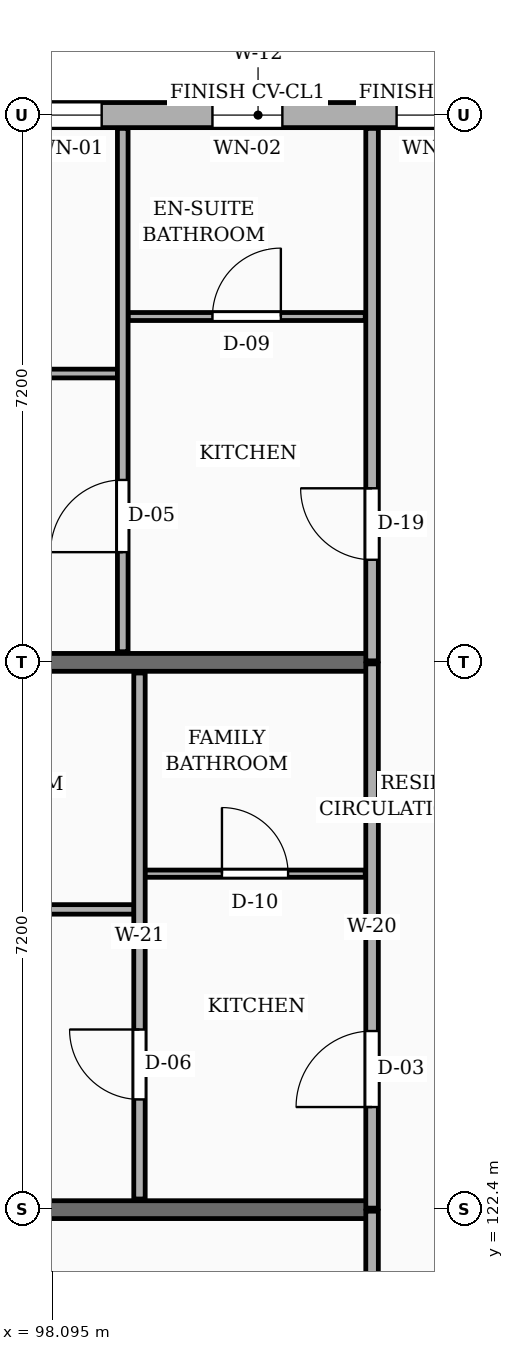
"""IFC4 building model, lengths in metres.
Left out: names, types, materials, properties, quantities, classifications, styles, units other than length and angle.
Written with IfcOpenShell. Run it as: python <this file> out.ifc"""

import sys

from ifc_helpers import new_model, si_unit, direction, frame, frame_2d, origin, place, context, subcontext, project, spatial, rectangle, extrude, element, fill, save


model = new_model("IFC4")
c1 = context("Model", 3, precision=1e-05, world=origin(), true_north=direction((0.0, 1.0)))
c2 = subcontext(c1, "Body", "Model", "MODEL_VIEW")
j1 = project(units=[si_unit("LENGTHUNIT", "METRE"), si_unit("PLANEANGLEUNIT", "RADIAN")], contexts=[c1])
p1 = place(None, origin())
s1 = spatial("IfcSite", under=j1, at=p1, CompositionType="ELEMENT")
p2 = place(p1, origin())
s2 = spatial("IfcBuilding", under=s1, at=p2, CompositionType="ELEMENT")
p3 = place(p2, frame((0.0, 0.0, 20.25)))
s3 = spatial("IfcBuildingStorey", under=s2, at=p3, CompositionType="ELEMENT", Elevation=20.25)
for number, where, z_axis, x_axis in (
    (1, (90.275, 122.4, 0.0), (0.0, 0.0, 1.0), (1.0, 0.0, 0.0)),
    (2, (90.275, 129.6, 0.0), (0.0, 0.0, 1.0), (1.0, 0.0, 0.0)),
):
    element("IfcWall", number, at=place(p3, frame(where, z_axis=z_axis, x_axis=x_axis)), inside=s3, PredefinedType="SOLIDWALL", context=c2, shape_type="SweptSolid", body=[
        extrude(rectangle(XDim=12.025, YDim=0.235, at=frame_2d((6.013, 0.0))), origin(), (0.0, 0.0, 1.0), 2.19),
    ])
p4 = place(p3, frame((104.125, 136.8, 0.0), z_axis=(0.0, 0.0, 1.0), x_axis=(-1.0, 0.0, 0.0)))
e3 = element("IfcWall", 3, at=p4, inside=s3, PredefinedType="SOLIDWALL", context=c2, shape_type="SweptSolid", body=[
    extrude(rectangle(XDim=6.65, YDim=0.33, at=frame_2d((3.325, 0.0))), origin(), (0.0, 0.0, 1.0), 2.46),
])
p5 = place(p4, frame((0.462, 0.0, 0.78)))
e4 = element("IfcOpeningElement", 4, at=p5, cuts=e3, PredefinedType="OPENING", context=c2, shape_type="SweptSolid", body=[
    extrude(rectangle(XDim=1.04, YDim=1.26, at=frame_2d((0.52, 0.63))), frame((0.0, 0.175, 0.0), z_axis=(0.0, -1.0, 0.0), x_axis=(1.0, 0.0, 0.0)), (0.0, 0.0, 1.0), 0.35),
])
p6 = place(p4, frame((3.005, 0.0, 0.78)))
e5 = element("IfcOpeningElement", 5, at=p6, cuts=e3, PredefinedType="OPENING", context=c2, shape_type="SweptSolid", body=[
    extrude(rectangle(XDim=0.92, YDim=1.15, at=frame_2d((0.46, 0.575))), frame((0.0, 0.175, 0.0), z_axis=(0.0, -1.0, 0.0), x_axis=(1.0, 0.0, 0.0)), (0.0, 0.0, 1.0), 0.35),
])
p7 = place(p4, frame((5.383, 0.0, 0.78)))
e6 = element("IfcOpeningElement", 6, at=p7, cuts=e3, PredefinedType="OPENING", context=c2, shape_type="SweptSolid", body=[
    extrude(rectangle(XDim=0.85, YDim=1.15, at=frame_2d((0.425, 0.575))), frame((0.0, 0.175, 0.0), z_axis=(0.0, -1.0, 0.0), x_axis=(1.0, 0.0, 0.0)), (0.0, 0.0, 1.0), 0.35),
])
p8 = place(p3, frame((102.3, 115.22, 0.0), z_axis=(0.0, 0.0, 1.0), x_axis=(0.0, 1.0, 0.0)))
e7 = element("IfcWall", 7, at=p8, inside=s3, PredefinedType="PARTITIONING", context=c2, shape_type="SweptSolid", body=[
    extrude(rectangle(XDim=7.16, YDim=0.165, at=frame_2d((3.58, 0.0))), origin(), (0.0, 0.0, 1.0), 2.325),
])
p9 = place(p8, frame((4.78, 0.0, 0.0)))
e8 = element("IfcOpeningElement", 8, at=p9, cuts=e7, PredefinedType="OPENING", context=c2, shape_type="SweptSolid", body=[
    extrude(rectangle(XDim=1.14, YDim=2.18, at=frame_2d((0.57, 1.09))), frame((0.0, 0.093, 0.0), z_axis=(0.0, -1.0, 0.0), x_axis=(1.0, 0.0, 0.0)), (0.0, 0.0, 1.0), 0.185),
])
p10 = place(p3, frame((102.3, 122.42, 0.0), z_axis=(0.0, 0.0, 1.0), x_axis=(0.0, 1.0, 0.0)))
e9 = element("IfcWall", 9, at=p10, inside=s3, PredefinedType="PARTITIONING", context=c2, shape_type="SweptSolid", body=[
    extrude(rectangle(XDim=7.16, YDim=0.165, at=frame_2d((3.58, 0.0))), origin(), (0.0, 0.0, 1.0), 2.325),
])
p11 = place(p10, frame((1.33, 0.0, 0.0)))
e10 = element("IfcOpeningElement", 10, at=p11, cuts=e9, PredefinedType="OPENING", context=c2, shape_type="SweptSolid", body=[
    extrude(rectangle(XDim=1.0, YDim=2.15, at=frame_2d((0.5, 1.075))), frame((0.0, 0.093, 0.0), z_axis=(0.0, -1.0, 0.0), x_axis=(1.0, 0.0, 0.0)), (0.0, 0.0, 1.0), 0.185),
])
p12 = place(p3, frame((102.3, 129.62, 0.0), z_axis=(0.0, 0.0, 1.0), x_axis=(0.0, 1.0, 0.0)))
e11 = element("IfcWall", 11, at=p12, inside=s3, PredefinedType="PARTITIONING", context=c2, shape_type="SweptSolid", body=[
    extrude(rectangle(XDim=7.005, YDim=0.165, at=frame_2d((3.502, 0.0))), origin(), (0.0, 0.0, 1.0), 2.325),
])
p13 = place(p12, frame((1.33, 0.0, 0.0)))
e12 = element("IfcOpeningElement", 12, at=p13, cuts=e11, PredefinedType="OPENING", context=c2, shape_type="SweptSolid", body=[
    extrude(rectangle(XDim=0.94, YDim=2.12, at=frame_2d((0.47, 1.06))), frame((0.0, 0.093, 0.0), z_axis=(0.0, -1.0, 0.0), x_axis=(1.0, 0.0, 0.0)), (0.0, 0.0, 1.0), 0.185),
])
p14 = place(p3, frame((90.175, 126.35, 0.0), z_axis=(0.0, 0.0, 1.0), x_axis=(1.0, 0.0, 0.0)))
e13 = element("IfcWall", 13, at=p14, inside=s3, PredefinedType="PARTITIONING", context=c2, shape_type="SweptSolid", body=[
    extrude(rectangle(XDim=8.995, YDim=0.125, at=frame_2d((4.498, 0.0))), origin(), (0.0, 0.0, 1.0), 2.325),
])
p15 = place(p14, frame((4.058, 0.0, 0.0)))
e14 = element("IfcOpeningElement", 14, at=p15, cuts=e13, PredefinedType="OPENING", context=c2, shape_type="SweptSolid", body=[
    extrude(rectangle(XDim=0.88, YDim=2.08, at=frame_2d((0.44, 1.04))), frame((0.0, 0.073, 0.0), z_axis=(0.0, -1.0, 0.0), x_axis=(1.0, 0.0, 0.0)), (0.0, 0.0, 1.0), 0.145),
])
p16 = place(p3, frame((99.31, 126.82, 0.0), z_axis=(0.0, 0.0, 1.0), x_axis=(1.0, 0.0, 0.0)))
e15 = element("IfcWall", 15, at=p16, inside=s3, PredefinedType="PARTITIONING", context=c2, shape_type="SweptSolid", body=[
    extrude(rectangle(XDim=2.9, YDim=0.095, at=frame_2d((1.45, 0.0))), origin(), (0.0, 0.0, 1.0), 2.325),
])
p17 = place(p16, frame((1.015, 0.0, 0.0)))
e16 = element("IfcOpeningElement", 16, at=p17, cuts=e15, PredefinedType="OPENING", context=c2, shape_type="SweptSolid", body=[
    extrude(rectangle(XDim=0.87, YDim=2.05, at=frame_2d((0.435, 1.025))), frame((0.0, 0.058, 0.0), z_axis=(0.0, -1.0, 0.0), x_axis=(1.0, 0.0, 0.0)), (0.0, 0.0, 1.0), 0.115),
])
p18 = place(p3, frame((99.24, 122.54, 0.0), z_axis=(0.0, 0.0, 1.0), x_axis=(0.0, 1.0, 0.0)))
e17 = element("IfcWall", 17, at=p18, inside=s3, PredefinedType="PARTITIONING", context=c2, shape_type="SweptSolid", body=[
    extrude(rectangle(XDim=6.92, YDim=0.15, at=frame_2d((3.46, 0.0))), origin(), (0.0, 0.0, 1.0), 2.325),
])
p19 = place(p18, frame((1.31, 0.0, 0.0)))
e18 = element("IfcOpeningElement", 18, at=p19, cuts=e17, PredefinedType="OPENING", context=c2, shape_type="SweptSolid", body=[
    extrude(rectangle(XDim=0.92, YDim=2.1, at=frame_2d((0.46, 1.05))), frame((0.0, 0.085, 0.0), z_axis=(0.0, -1.0, 0.0), x_axis=(1.0, 0.0, 0.0)), (0.0, 0.0, 1.0), 0.17),
])
p20 = place(p3, frame((90.175, 133.4, 0.0), z_axis=(0.0, 0.0, 1.0), x_axis=(1.0, 0.0, 0.0)))
e19 = element("IfcWall", 19, at=p20, inside=s3, PredefinedType="PARTITIONING", context=c2, shape_type="SweptSolid", body=[
    extrude(rectangle(XDim=8.775, YDim=0.115, at=frame_2d((4.387, 0.0))), origin(), (0.0, 0.0, 1.0), 2.325),
])
p21 = place(p20, frame((3.938, 0.0, 0.0)))
e20 = element("IfcOpeningElement", 20, at=p21, cuts=e19, PredefinedType="OPENING", context=c2, shape_type="SweptSolid", body=[
    extrude(rectangle(XDim=0.9, YDim=2.1, at=frame_2d((0.45, 1.05))), frame((0.0, 0.067, 0.0), z_axis=(0.0, -1.0, 0.0), x_axis=(1.0, 0.0, 0.0)), (0.0, 0.0, 1.0), 0.135),
])
p22 = place(p3, frame((99.09, 134.15, 0.0), z_axis=(0.0, 0.0, 1.0), x_axis=(1.0, 0.0, 0.0)))
e21 = element("IfcWall", 21, at=p22, inside=s3, PredefinedType="PARTITIONING", context=c2, shape_type="SweptSolid", body=[
    extrude(rectangle(XDim=3.12, YDim=0.105, at=frame_2d((1.56, 0.0))), origin(), (0.0, 0.0, 1.0), 2.325),
])
p23 = place(p22, frame((1.11, 0.0, 0.0)))
e22 = element("IfcOpeningElement", 22, at=p23, cuts=e21, PredefinedType="OPENING", context=c2, shape_type="SweptSolid", body=[
    extrude(rectangle(XDim=0.9, YDim=2.05, at=frame_2d((0.45, 1.025))), frame((0.0, 0.062, 0.0), z_axis=(0.0, -1.0, 0.0), x_axis=(1.0, 0.0, 0.0)), (0.0, 0.0, 1.0), 0.125),
])
p24 = place(p3, frame((99.02, 129.74, 0.0), z_axis=(0.0, 0.0, 1.0), x_axis=(0.0, 1.0, 0.0)))
e23 = element("IfcWall", 23, at=p24, inside=s3, PredefinedType="PARTITIONING", context=c2, shape_type="SweptSolid", body=[
    extrude(rectangle(XDim=6.885, YDim=0.14, at=frame_2d((3.442, 0.0))), origin(), (0.0, 0.0, 1.0), 2.325),
])
p25 = place(p24, frame((1.31, 0.0, 0.0)))
e24 = element("IfcOpeningElement", 24, at=p25, cuts=e23, PredefinedType="OPENING", context=c2, shape_type="SweptSolid", body=[
    extrude(rectangle(XDim=0.95, YDim=2.1, at=frame_2d((0.475, 1.05))), frame((0.0, 0.08, 0.0), z_axis=(0.0, -1.0, 0.0), x_axis=(1.0, 0.0, 0.0)), (0.0, 0.0, 1.0), 0.16),
])
p26 = place(p5, origin())
e25 = element("IfcWindow", 25, at=p26, inside=s3, PartitioningType="SINGLE_PANEL", PredefinedType="WINDOW", context=c2, shape_type="SweptSolid", body=[
    extrude(rectangle(XDim=1.04, YDim=1.26, at=frame_2d((0.52, 0.63))), frame((0.0, 0.03, 0.0), z_axis=(0.0, -1.0, 0.0), x_axis=(1.0, 0.0, 0.0)), (0.0, 0.0, 1.0), 0.06),
])
fill(e4, e25)
p27 = place(p6, origin())
e26 = element("IfcWindow", 26, at=p27, inside=s3, PartitioningType="SINGLE_PANEL", PredefinedType="WINDOW", context=c2, shape_type="SweptSolid", body=[
    extrude(rectangle(XDim=0.92, YDim=1.15, at=frame_2d((0.46, 0.575))), frame((0.0, 0.03, 0.0), z_axis=(0.0, -1.0, 0.0), x_axis=(1.0, 0.0, 0.0)), (0.0, 0.0, 1.0), 0.06),
])
fill(e5, e26)
p28 = place(p7, origin())
e27 = element("IfcWindow", 27, at=p28, inside=s3, PartitioningType="SINGLE_PANEL", PredefinedType="WINDOW", context=c2, shape_type="SweptSolid", body=[
    extrude(rectangle(XDim=0.85, YDim=1.15, at=frame_2d((0.425, 0.575))), frame((0.0, 0.03, 0.0), z_axis=(0.0, -1.0, 0.0), x_axis=(1.0, 0.0, 0.0)), (0.0, 0.0, 1.0), 0.06),
])
fill(e6, e27)
p29 = place(p11, origin())
e28 = element("IfcDoor", 28, at=p29, inside=s3, OperationType="SINGLE_SWING_LEFT", PredefinedType="DOOR", context=c2, shape_type="SweptSolid", body=[
    extrude(rectangle(XDim=1.0, YDim=2.15, at=frame_2d((0.5, 1.075))), frame((0.0, 0.025, 0.0), z_axis=(0.0, -1.0, 0.0), x_axis=(1.0, 0.0, 0.0)), (0.0, 0.0, 1.0), 0.05),
])
fill(e10, e28)
p30 = place(p13, origin())
e29 = element("IfcDoor", 29, at=p30, inside=s3, OperationType="SINGLE_SWING_RIGHT", PredefinedType="DOOR", context=c2, shape_type="SweptSolid", body=[
    extrude(rectangle(XDim=0.94, YDim=2.12, at=frame_2d((0.47, 1.06))), frame((0.0, 0.025, 0.0), z_axis=(0.0, -1.0, 0.0), x_axis=(1.0, 0.0, 0.0)), (0.0, 0.0, 1.0), 0.05),
])
fill(e12, e29)
p31 = place(p17, origin())
e30 = element("IfcDoor", 30, at=p31, inside=s3, OperationType="SINGLE_SWING_LEFT", PredefinedType="DOOR", context=c2, shape_type="SweptSolid", body=[
    extrude(rectangle(XDim=0.87, YDim=2.05, at=frame_2d((0.435, 1.025))), frame((0.0, 0.025, 0.0), z_axis=(0.0, -1.0, 0.0), x_axis=(1.0, 0.0, 0.0)), (0.0, 0.0, 1.0), 0.05),
])
fill(e16, e30)
p32 = place(p19, origin())
e31 = element("IfcDoor", 31, at=p32, inside=s3, OperationType="SINGLE_SWING_RIGHT", PredefinedType="DOOR", context=c2, shape_type="SweptSolid", body=[
    extrude(rectangle(XDim=0.92, YDim=2.1, at=frame_2d((0.46, 1.05))), frame((0.0, 0.025, 0.0), z_axis=(0.0, -1.0, 0.0), x_axis=(1.0, 0.0, 0.0)), (0.0, 0.0, 1.0), 0.05),
])
fill(e18, e31)
p33 = place(p23, origin())
e32 = element("IfcDoor", 32, at=p33, inside=s3, OperationType="SINGLE_SWING_RIGHT", PredefinedType="DOOR", context=c2, shape_type="SweptSolid", body=[
    extrude(rectangle(XDim=0.9, YDim=2.05, at=frame_2d((0.45, 1.025))), frame((0.0, 0.025, 0.0), z_axis=(0.0, -1.0, 0.0), x_axis=(1.0, 0.0, 0.0)), (0.0, 0.0, 1.0), 0.05),
])
fill(e22, e32)
p34 = place(p25, origin())
e33 = element("IfcDoor", 33, at=p34, inside=s3, OperationType="SINGLE_SWING_LEFT", PredefinedType="DOOR", context=c2, shape_type="SweptSolid", body=[
    extrude(rectangle(XDim=0.95, YDim=2.1, at=frame_2d((0.475, 1.05))), frame((0.0, 0.025, 0.0), z_axis=(0.0, -1.0, 0.0), x_axis=(1.0, 0.0, 0.0)), (0.0, 0.0, 1.0), 0.05),
])
fill(e24, e33)
save(model, sys.argv[1])
